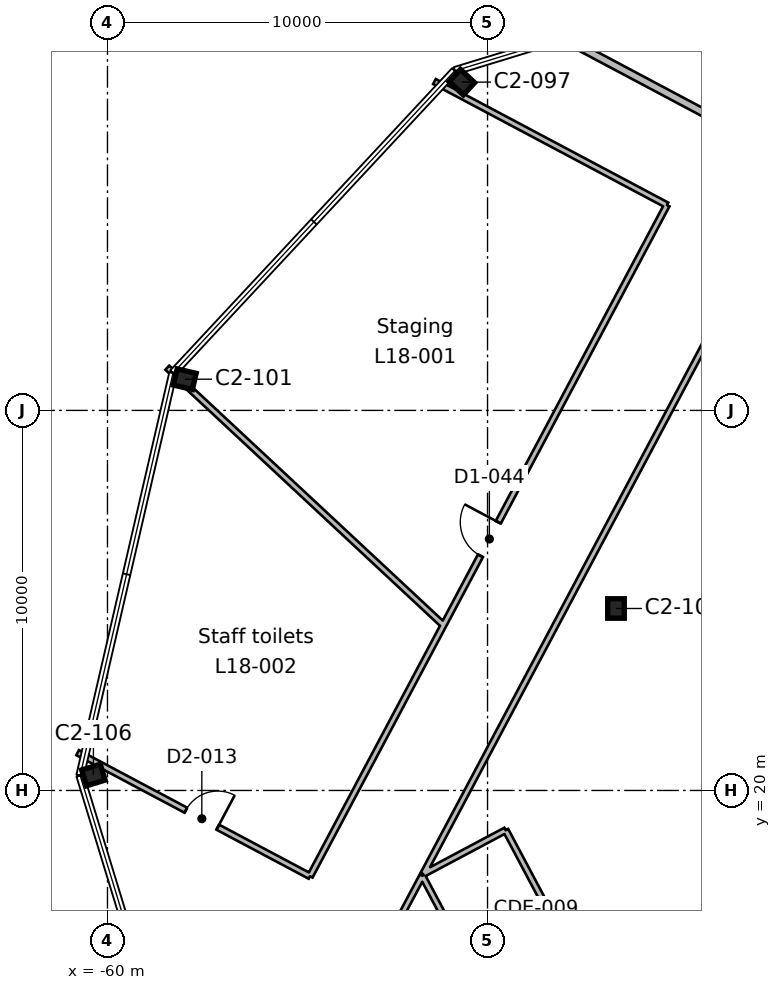
"""IFC4 building model, lengths in metres.
Left out: names, types, materials, properties, quantities, classifications, styles, units other than length and angle.
Written with IfcOpenShell. Run it as: python <this file> out.ifc"""

import sys

from ifc_helpers import new_model, si_unit, direction, frame, frame_2d, origin, origin_2d, place, context, subcontext, project, spatial, rectangle, i_section, extrude, element, fill, save


model = new_model("IFC4")
c1 = context("Model", 3, precision=1e-05, world=origin(), true_north=direction((0.0, 1.0)))
c2 = subcontext(c1, "Body", "Model", "MODEL_VIEW")
j1 = project(units=[si_unit("LENGTHUNIT", "METRE"), si_unit("PLANEANGLEUNIT", "RADIAN")], contexts=[c1])
p1 = place(None, origin())
s1 = spatial("IfcSite", under=j1, at=p1, CompositionType="ELEMENT")
p2 = place(p1, origin())
s2 = spatial("IfcBuilding", under=s1, at=p2, CompositionType="ELEMENT")
p3 = place(p2, frame((0.0, 0.0, 93.8)))
s3 = spatial("IfcBuildingStorey", under=s2, at=p3, CompositionType="ELEMENT", Elevation=93.8)
for number, where, z_axis, x_axis in (
    (1, (-60.37, 20.406, 0.0), (0.0, 0.0, 1.0), (0.292, -0.956, 0.0)),
    (2, (-46.62, 24.788, 0.0), (0.0, 0.0, 1.0), (1.0, 0.0, 0.0)),
    (3, (-57.966, 30.821, 0.0), (0.0, 0.0, 1.0), (-0.225, -0.974, 0.0)),
    (4, (-50.675, 38.638, 0.0), (0.0, 0.0, 1.0), (-0.682, -0.731, 0.0)),
):
    element("IfcColumn", number, at=place(p3, frame(where, z_axis=z_axis, x_axis=x_axis)), inside=s3, PredefinedType="COLUMN", context=c2, shape_type="SweptSolid", body=[
        extrude(i_section(OverallWidth=0.437, OverallDepth=0.513, WebThickness=0.061, FlangeThickness=0.097, FilletRadius=0.015, at=origin_2d()), origin(), (0.0, 0.0, 1.0), 4.6),
    ])
p4 = place(p3, frame((-54.67, 17.743, 0.0), z_axis=(0.0, 0.0, 1.0), x_axis=(0.469484822724, 0.882940542297, 0.0)))
e5 = element("IfcWall", 5, at=p4, inside=s3, PredefinedType="PARTITIONING", context=c2, shape_type="SweptSolid", body=[
    extrude(rectangle(XDim=20.0, YDim=0.15, at=frame_2d((10.0, 0.0))), origin(), (0.0, 0.0, 1.0), 4.2),
])
p5 = place(p4, frame((9.55, 0.0, 0.0)))
e6 = element("IfcOpeningElement", 6, at=p5, cuts=e5, PredefinedType="OPENING", context=c2, shape_type="SweptSolid", body=[
    extrude(rectangle(XDim=1.0, YDim=2.1, at=frame_2d((0.5, 1.05))), frame((0.0, 0.085, 0.0), z_axis=(0.0, -1.0, 0.0), x_axis=(1.0, 0.0, 0.0)), (0.0, 0.0, 1.0), 0.17),
])
p6 = place(p3, frame((-45.28, 35.402, 0.0), z_axis=(0.0, 0.0, 1.0), x_axis=(-0.883034938071, 0.469307253456, 0.0)))
e7 = element("IfcWall", 7, at=p6, inside=s3, PredefinedType="PARTITIONING", context=c2, shape_type="SweptSolid", body=[
    extrude(rectangle(XDim=6.927, YDim=0.15, at=frame_2d((3.464, 0.0))), origin(), (0.0, 0.0, 1.0), 4.2),
])
p7 = place(p3, frame((-58.427, 31.125, 0.0), z_axis=(0.0, 0.0, 1.0), x_axis=(0.731469280526, -0.6818743958, 0.0)))
e8 = element("IfcWall", 8, at=p7, inside=s3, PredefinedType="PARTITIONING", context=c2, shape_type="SweptSolid", body=[
    extrude(rectangle(XDim=9.939, YDim=0.15, at=frame_2d((4.969, 0.0))), origin(), (0.0, 0.0, 1.0), 4.2),
])
p8 = place(p3, frame((-54.67, 17.743, 0.0), z_axis=(0.0, 0.0, 1.0), x_axis=(-0.882930834394, 0.469503079517, 0.0)))
e9 = element("IfcWall", 9, at=p8, inside=s3, PredefinedType="PARTITIONING", context=c2, shape_type="SweptSolid", body=[
    extrude(rectangle(XDim=6.927, YDim=0.15, at=frame_2d((3.463, 0.0))), origin(), (0.0, 0.0, 1.0), 4.2),
])
p9 = place(p8, frame((2.75, 0.0, 0.0)))
e10 = element("IfcOpeningElement", 10, at=p9, cuts=e9, PredefinedType="OPENING", context=c2, shape_type="SweptSolid", body=[
    extrude(rectangle(XDim=0.95, YDim=2.1, at=frame_2d((0.475, 1.05))), frame((0.0, 0.085, 0.0), z_axis=(0.0, -1.0, 0.0), x_axis=(1.0, 0.0, 0.0)), (0.0, 0.0, 1.0), 0.17),
])
p10 = place(p3, frame((-47.637, 15.409, 0.0), z_axis=(0.0, 0.0, 1.0), x_axis=(-0.469590790968, 0.882884187783, 0.0)))
e11 = element("IfcWall", 11, at=p10, inside=s3, PredefinedType="PARTITIONING", context=c2, shape_type="SweptSolid", body=[
    extrude(rectangle(XDim=4.016, YDim=0.15, at=frame_2d((2.008, 0.0))), origin(), (0.0, 0.0, 1.0), 4.2),
])
p11 = place(p3, frame((-49.523, 18.954, 0.0), z_axis=(0.0, 0.0, 1.0), x_axis=(-0.882767334528, -0.469810422501, 0.0)))
e12 = element("IfcWall", 12, at=p11, inside=s3, PredefinedType="PARTITIONING", context=c2, shape_type="SweptSolid", body=[
    extrude(rectangle(XDim=2.461, YDim=0.15, at=frame_2d((1.23, 0.0))), origin(), (0.0, 0.0, 1.0), 4.2),
])
p12 = place(p3, frame((-51.695, 17.798, 0.0), z_axis=(0.0, 0.0, 1.0), x_axis=(0.469483567396, 0.88294120979, 0.0)))
e13 = element("IfcWall", 13, at=p12, inside=s3, PredefinedType="PARTITIONING", context=c2, shape_type="SweptSolid", body=[
    extrude(rectangle(XDim=18.555, YDim=0.15, at=frame_2d((9.277, 0.0))), origin(), (0.0, 0.0, 1.0), 4.2),
])
p13 = place(p3, frame((-48.271, 39.936, 0.0), z_axis=(0.0, 0.0, 1.0), x_axis=(0.88294856545, -0.469469733604, 0.0)))
e14 = element("IfcWall", 14, at=p13, inside=s3, PredefinedType="PARTITIONING", context=c2, shape_type="SweptSolid", body=[
    extrude(rectangle(XDim=54.67, YDim=0.2, at=frame_2d((27.335, 0.0))), origin(), (0.0, 0.0, 1.0), 4.2),
])
p14 = place(p13, frame((27.766, 0.0, 0.0)))
e15 = element("IfcOpeningElement", 15, at=p14, cuts=e14, PredefinedType="OPENING", context=c2, shape_type="SweptSolid", body=[
    extrude(rectangle(XDim=1.0, YDim=2.1, at=frame_2d((0.5, 1.05))), frame((0.0, 0.11, 0.0), z_axis=(0.0, -1.0, 0.0), x_axis=(1.0, 0.0, 0.0)), (0.0, 0.0, 1.0), 0.22),
])
p15 = place(p13, frame((26.066, 0.0, 0.0)))
e16 = element("IfcOpeningElement", 16, at=p15, cuts=e14, PredefinedType="OPENING", context=c2, shape_type="SweptSolid", body=[
    extrude(rectangle(XDim=1.0, YDim=2.1, at=frame_2d((0.5, 1.05))), frame((0.0, 0.11, 0.0), z_axis=(0.0, -1.0, 0.0), x_axis=(1.0, 0.0, 0.0)), (0.0, 0.0, 1.0), 0.22),
])
p16 = place(p13, frame((15.265, 0.0, 0.0)))
e17 = element("IfcOpeningElement", 17, at=p16, cuts=e14, PredefinedType="OPENING", context=c2, shape_type="SweptSolid", body=[
    extrude(rectangle(XDim=1.0, YDim=2.1, at=frame_2d((0.5, 1.05))), frame((0.0, 0.11, 0.0), z_axis=(0.0, -1.0, 0.0), x_axis=(1.0, 0.0, 0.0)), (0.0, 0.0, 1.0), 0.22),
])
p17 = place(p3, frame((-50.544, 15.549, 0.0), z_axis=(0.0, 0.0, 1.0), x_axis=(-0.469183782948, 0.883100547967, 0.0)))
e18 = element("IfcWall", 18, at=p17, inside=s3, PredefinedType="PARTITIONING", context=c2, shape_type="SweptSolid", body=[
    extrude(rectangle(XDim=2.5, YDim=0.15, at=frame_2d((1.25, 0.0))), origin(), (0.0, 0.0, 1.0), 4.2),
])
p18 = place(p3, frame((-51.717, 17.757, 0.0), z_axis=(0.0, 0.0, 1.0), x_axis=(-0.469618761384, -0.882869310236, 0.0)))
e19 = element("IfcWall", 19, at=p18, inside=s3, PredefinedType="PARTITIONING", context=c2, shape_type="SweptSolid", body=[
    extrude(rectangle(XDim=1.399, YDim=0.15, at=frame_2d((0.699, 0.0))), origin(), (0.0, 0.0, 1.0), 4.2),
])
p19 = place(p5, origin())
e20 = element("IfcDoor", 20, at=p19, inside=s3, OperationType="SINGLE_SWING_RIGHT", PredefinedType="DOOR", context=c2, shape_type="SweptSolid", body=[
    extrude(rectangle(XDim=1.0, YDim=2.1, at=frame_2d((0.5, 1.05))), frame((0.0, 0.025, 0.0), z_axis=(0.0, -1.0, 0.0), x_axis=(1.0, 0.0, 0.0)), (0.0, 0.0, 1.0), 0.05),
])
fill(e6, e20)
p20 = place(p9, frame((0.95, 0.0, 0.0), z_axis=(0.0, 0.0, 1.0), x_axis=(-1.0, 0.0, 0.0)))
e21 = element("IfcDoor", 21, at=p20, inside=s3, OperationType="SINGLE_SWING_RIGHT", PredefinedType="DOOR", context=c2, shape_type="SweptSolid", body=[
    extrude(rectangle(XDim=0.95, YDim=2.1, at=frame_2d((0.475, 1.05))), frame((0.0, 0.025, 0.0), z_axis=(0.0, -1.0, 0.0), x_axis=(1.0, 0.0, 0.0)), (0.0, 0.0, 1.0), 0.05),
])
fill(e10, e21)
save(model, sys.argv[1])
